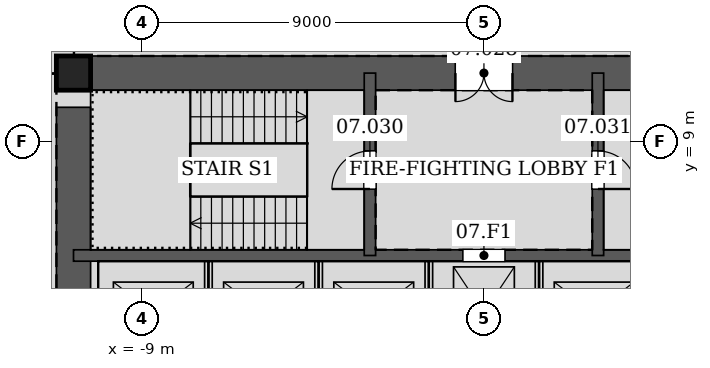
"""IFC4 building model, lengths in metres.
Left out: names, types, materials, properties, quantities, classifications, styles, units other than length and angle.
Written with IfcOpenShell. Run it as: python <this file> out.ifc"""

import sys

from ifc_helpers import new_model, si_unit, direction, frame, frame_2d, origin, origin_2d, place, context, subcontext, project, spatial, rectangle, hollow_rectangle, extrude, element, fill, save


model = new_model("IFC4")
c1 = context("Model", 3, precision=1e-05, world=origin(), true_north=direction((0.0, 1.0)))
c2 = subcontext(c1, "Body", "Model", "MODEL_VIEW")
j1 = project(units=[si_unit("LENGTHUNIT", "METRE"), si_unit("PLANEANGLEUNIT", "RADIAN")], contexts=[c1])
p1 = place(None, origin())
s1 = spatial("IfcSite", under=j1, at=p1, CompositionType="ELEMENT")
p2 = place(p1, origin())
s2 = spatial("IfcBuilding", under=s1, at=p2, CompositionType="ELEMENT")
p3 = place(p2, frame((0.0, 0.0, 37.2)))
s3 = spatial("IfcBuildingStorey", under=s2, at=p3, CompositionType="ELEMENT", Elevation=37.2)
p4 = place(p3, frame((-10.8, 10.8, 0.0), z_axis=(0.0, 0.0, 1.0), x_axis=(1.0, 0.0, 0.0)))
e1 = element("IfcColumn", 1, at=p4, inside=s3, PredefinedType="COLUMN", context=c2, shape_type="SweptSolid", body=[
    extrude(hollow_rectangle(XDim=0.9, YDim=0.9, WallThickness=0.06, at=origin_2d()), origin(), (0.0, 0.0, 1.0), 4.2),
])
p5 = place(p3, frame((10.8, 10.8, 0.0), z_axis=(0.0, 0.0, 1.0), x_axis=(-1.0, 0.0, 0.0)))
e2 = element("IfcWall", 2, at=p5, inside=s3, PredefinedType="SOLIDWALL", context=c2, shape_type="SweptSolid", body=[
    extrude(rectangle(XDim=21.6, YDim=0.9, at=frame_2d((10.8, 0.0))), origin(), (0.0, 0.0, 1.0), 4.2),
])
p6 = place(p5, frame((10.05, 0.0, 0.0)))
e3 = element("IfcOpeningElement", 3, at=p6, cuts=e2, PredefinedType="OPENING", context=c2, shape_type="SweptSolid", body=[
    extrude(rectangle(XDim=1.5, YDim=2.1, at=frame_2d((0.75, 1.05))), frame((0.0, 0.46, 0.0), z_axis=(0.0, -1.0, 0.0), x_axis=(1.0, 0.0, 0.0)), (0.0, 0.0, 1.0), 0.92),
])
p7 = place(p3, frame((-10.8, 10.8, 0.0), z_axis=(0.0, 0.0, 1.0), x_axis=(0.0, -1.0, 0.0)))
e4 = element("IfcWall", 4, at=p7, inside=s3, PredefinedType="SOLIDWALL", context=c2, shape_type="SweptSolid", body=[
    extrude(rectangle(XDim=21.6, YDim=0.9, at=frame_2d((10.8, 0.0))), origin(), (0.0, 0.0, 1.0), 4.2),
])
p8 = place(p7, frame((8.7, 0.0, 0.0)))
e5 = element("IfcOpeningElement", 5, at=p8, cuts=e4, PredefinedType="OPENING", context=c2, shape_type="SweptSolid", body=[
    extrude(rectangle(XDim=1.2, YDim=2.1, at=frame_2d((0.6, 1.05))), frame((0.0, 0.46, 0.0), z_axis=(0.0, -1.0, 0.0), x_axis=(1.0, 0.0, 0.0)), (0.0, 0.0, 1.0), 0.92),
])
p9 = place(p7, frame((11.7, 0.0, 0.0)))
e6 = element("IfcOpeningElement", 6, at=p9, cuts=e4, PredefinedType="OPENING", context=c2, shape_type="SweptSolid", body=[
    extrude(rectangle(XDim=1.2, YDim=2.1, at=frame_2d((0.6, 1.05))), frame((0.0, 0.46, 0.0), z_axis=(0.0, -1.0, 0.0), x_axis=(1.0, 0.0, 0.0)), (0.0, 0.0, 1.0), 0.92),
])
p10 = place(p3, frame((-10.8, 6.0, 0.0), z_axis=(0.0, 0.0, 1.0), x_axis=(1.0, 0.0, 0.0)))
e7 = element("IfcWall", 7, at=p10, inside=s3, PredefinedType="SOLIDWALL", context=c2, shape_type="SweptSolid", body=[
    extrude(rectangle(XDim=21.6, YDim=0.3, at=frame_2d((10.8, 0.0))), origin(), (0.0, 0.0, 1.0), 4.2),
])
p11 = place(p10, frame((10.25, 0.0, 0.0)))
e8 = element("IfcOpeningElement", 8, at=p11, cuts=e7, PredefinedType="OPENING", context=c2, shape_type="SweptSolid", body=[
    extrude(rectangle(XDim=1.1, YDim=2.1, at=frame_2d((0.55, 1.05))), frame((0.0, 0.16, 0.0), z_axis=(0.0, -1.0, 0.0), x_axis=(1.0, 0.0, 0.0)), (0.0, 0.0, 1.0), 0.32),
])
p12 = place(p3, frame((-3.0, 6.0, 0.0), z_axis=(0.0, 0.0, 1.0), x_axis=(0.0, 1.0, 0.0)))
e9 = element("IfcWall", 9, at=p12, inside=s3, PredefinedType="SOLIDWALL", context=c2, shape_type="SweptSolid", body=[
    extrude(rectangle(XDim=4.8, YDim=0.3, at=frame_2d((2.4, 0.0))), origin(), (0.0, 0.0, 1.0), 4.2),
])
p13 = place(p12, frame((1.75, 0.0, 0.0)))
e10 = element("IfcOpeningElement", 10, at=p13, cuts=e9, PredefinedType="OPENING", context=c2, shape_type="SweptSolid", body=[
    extrude(rectangle(XDim=1.0, YDim=2.1, at=frame_2d((0.5, 1.05))), frame((0.0, 0.16, 0.0), z_axis=(0.0, -1.0, 0.0), x_axis=(1.0, 0.0, 0.0)), (0.0, 0.0, 1.0), 0.32),
])
p14 = place(p3, frame((3.0, 6.0, 0.0), z_axis=(0.0, 0.0, 1.0), x_axis=(0.0, 1.0, 0.0)))
e11 = element("IfcWall", 11, at=p14, inside=s3, PredefinedType="SOLIDWALL", context=c2, shape_type="SweptSolid", body=[
    extrude(rectangle(XDim=4.8, YDim=0.3, at=frame_2d((2.4, 0.0))), origin(), (0.0, 0.0, 1.0), 4.2),
])
p15 = place(p14, frame((1.75, 0.0, 0.0)))
e12 = element("IfcOpeningElement", 12, at=p15, cuts=e11, PredefinedType="OPENING", context=c2, shape_type="SweptSolid", body=[
    extrude(rectangle(XDim=1.0, YDim=2.1, at=frame_2d((0.5, 1.05))), frame((0.0, 0.16, 0.0), z_axis=(0.0, -1.0, 0.0), x_axis=(1.0, 0.0, 0.0)), (0.0, 0.0, 1.0), 0.32),
])
for number, where, z_axis, x_axis in (
    (13, (-7.25, 3.15, 0.0), (0.0, 0.0, 1.0), (0.0, 1.0, 0.0)),
    (14, (-4.35, 3.15, 0.0), (0.0, 0.0, 1.0), (0.0, 1.0, 0.0)),
    (15, (-1.45, 3.15, 0.0), (0.0, 0.0, 1.0), (0.0, 1.0, 0.0)),
    (16, (1.45, 3.15, 0.0), (0.0, 0.0, 1.0), (0.0, 1.0, 0.0)),
):
    element("IfcWall", number, at=place(p3, frame(where, z_axis=z_axis, x_axis=x_axis)), inside=s3, PredefinedType="PARTITIONING", context=c2, shape_type="SweptSolid", body=[
        extrude(rectangle(XDim=2.7, YDim=0.2, at=frame_2d((1.35, 0.0))), origin(), (0.0, 0.0, 1.0), 4.2),
    ])
p16 = place(p6, origin())
e17 = element("IfcDoor", 17, at=p16, inside=s3, OperationType="DOUBLE_DOOR_SINGLE_SWING", PredefinedType="DOOR", context=c2, shape_type="SweptSolid", body=[
    extrude(rectangle(XDim=1.5, YDim=2.1, at=frame_2d((0.75, 1.05))), frame((0.0, 0.025, 0.0), z_axis=(0.0, -1.0, 0.0), x_axis=(1.0, 0.0, 0.0)), (0.0, 0.0, 1.0), 0.05),
])
fill(e3, e17)
p17 = place(p13, origin())
e18 = element("IfcDoor", 18, at=p17, inside=s3, OperationType="SINGLE_SWING_LEFT", PredefinedType="DOOR", context=c2, shape_type="SweptSolid", body=[
    extrude(rectangle(XDim=1.0, YDim=2.1, at=frame_2d((0.5, 1.05))), frame((0.0, 0.025, 0.0), z_axis=(0.0, -1.0, 0.0), x_axis=(1.0, 0.0, 0.0)), (0.0, 0.0, 1.0), 0.05),
])
fill(e10, e18)
p18 = place(p15, frame((1.0, 0.0, 0.0), z_axis=(0.0, 0.0, 1.0), x_axis=(-1.0, 0.0, 0.0)))
e19 = element("IfcDoor", 19, at=p18, inside=s3, OperationType="SINGLE_SWING_RIGHT", PredefinedType="DOOR", context=c2, shape_type="SweptSolid", body=[
    extrude(rectangle(XDim=1.0, YDim=2.1, at=frame_2d((0.5, 1.05))), frame((0.0, 0.025, 0.0), z_axis=(0.0, -1.0, 0.0), x_axis=(1.0, 0.0, 0.0)), (0.0, 0.0, 1.0), 0.05),
])
fill(e12, e19)
p19 = place(p11, origin())
e20 = element("IfcDoor", 20, at=p19, inside=s3, OperationType="DOUBLE_DOOR_SLIDING", PredefinedType="DOOR", context=c2, shape_type="SweptSolid", body=[
    extrude(rectangle(XDim=1.1, YDim=2.1, at=frame_2d((0.55, 1.05))), frame((0.0, 0.025, 0.0), z_axis=(0.0, -1.0, 0.0), x_axis=(1.0, 0.0, 0.0)), (0.0, 0.0, 1.0), 0.05),
])
fill(e8, e20)
save(model, sys.argv[1])
